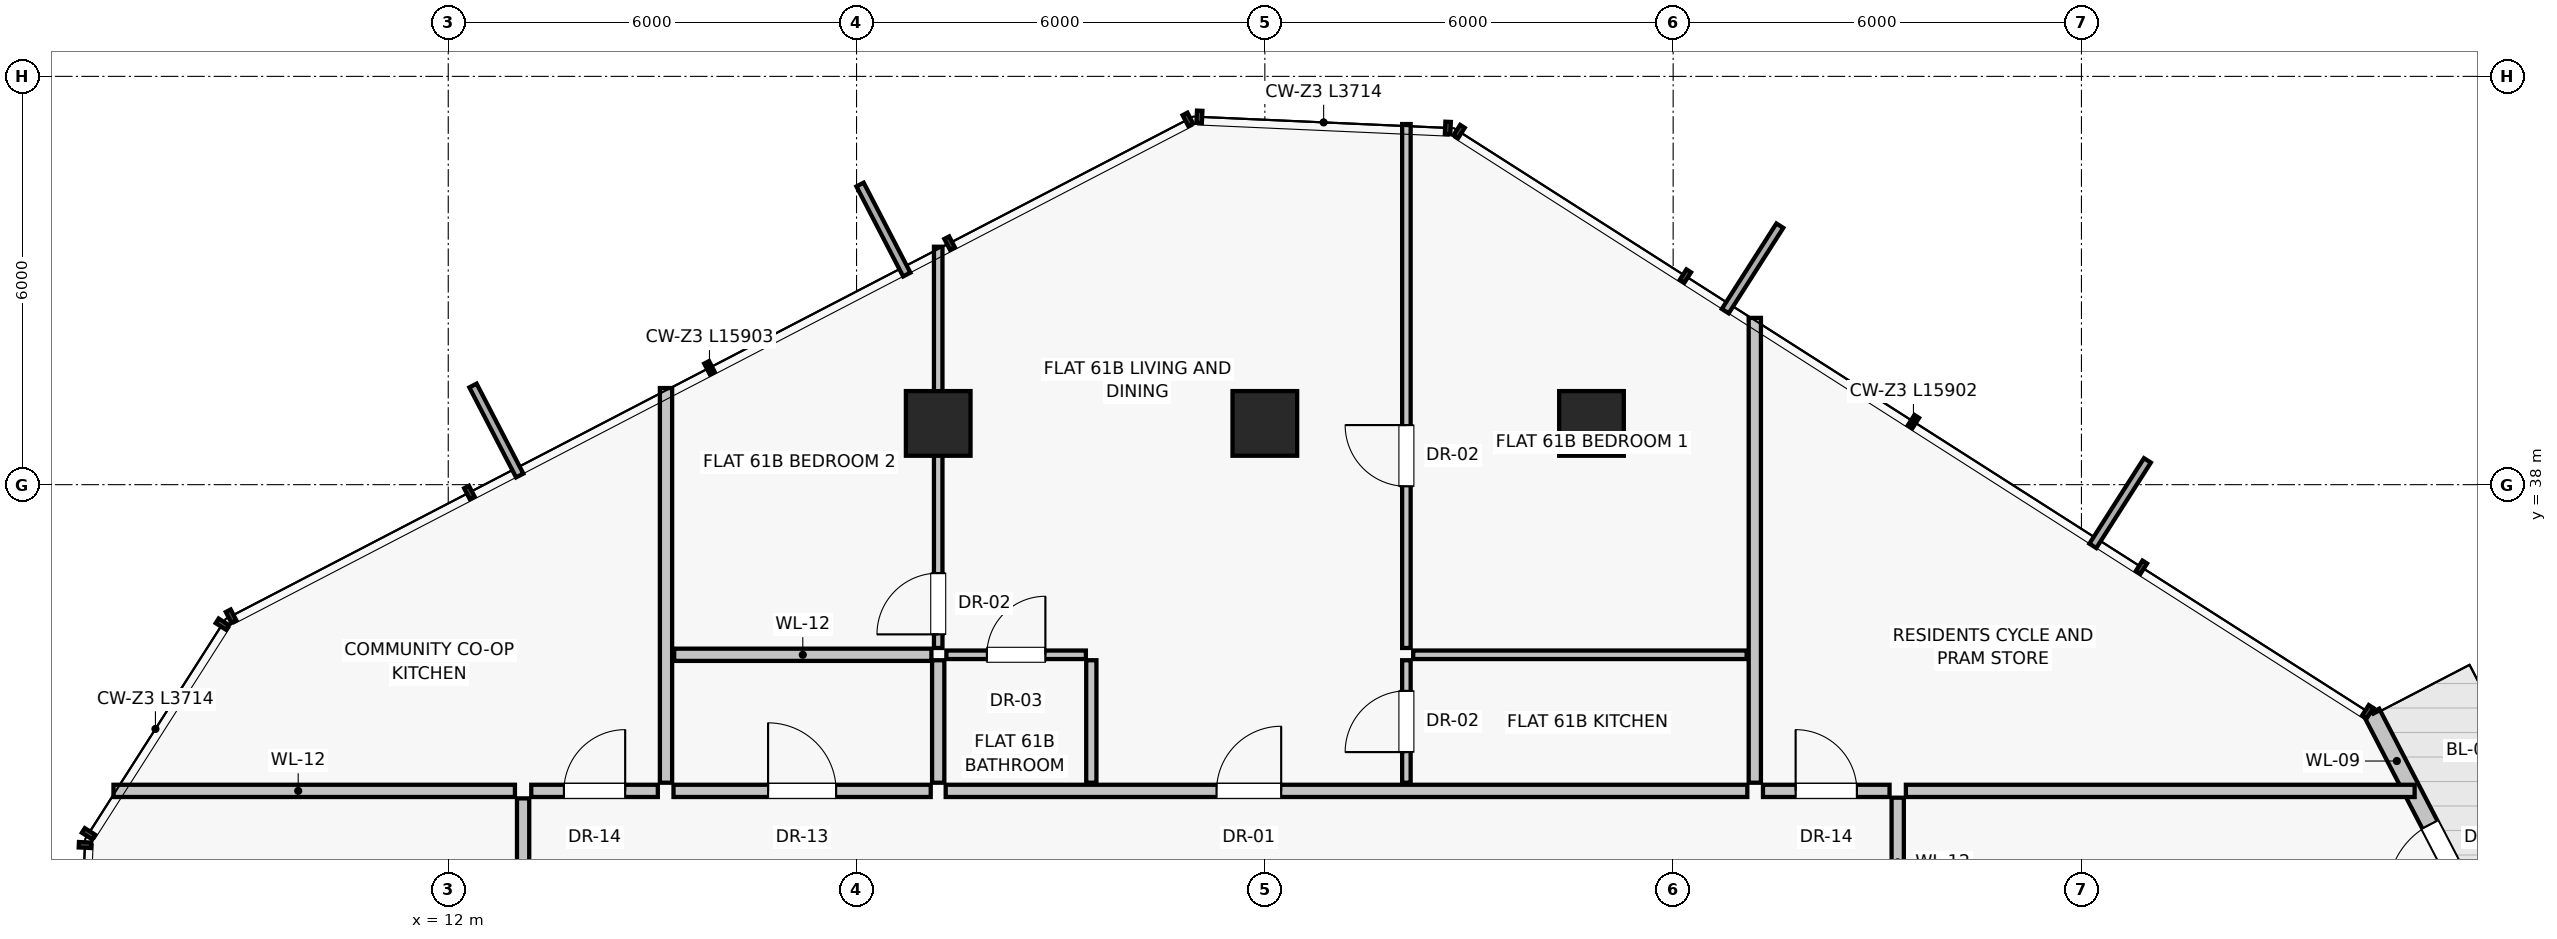
"""IFC4 building model, lengths in metres.
Left out: names, types, materials, properties, quantities, classifications, styles, units other than length and angle.
Written with IfcOpenShell. Run it as: python <this file> out.ifc"""

import sys

from ifc_helpers import new_model, si_unit, direction, frame, frame_2d, origin, origin_2d, place, context, subcontext, project, spatial, rectangle, extrude, source, transform, mapped, element, fill, save


model = new_model("IFC4")
c1 = context("Model", 3, precision=1e-05, world=origin(), true_north=direction((0.0, 1.0)))
c2 = subcontext(c1, "Body", "Model", "MODEL_VIEW")
j1 = project(units=[si_unit("LENGTHUNIT", "METRE"), si_unit("PLANEANGLEUNIT", "RADIAN")], contexts=[c1])
p1 = place(None, origin())
s1 = spatial("IfcSite", under=j1, at=p1, CompositionType="ELEMENT")
p2 = place(p1, origin())
s2 = spatial("IfcBuilding", under=s1, at=p2, CompositionType="ELEMENT")
p3 = place(p2, frame((0.0, 0.0, 215.65)))
s3 = spatial("IfcBuildingStorey", under=s2, at=p3, CompositionType="ELEMENT", Elevation=215.65)
for number, where, z_axis, x_axis in (
    (1, (28.8, 38.9, 0.0), (0.0, 0.0, 1.0), (1.0, 0.0, 0.0)),
    (2, (24.0, 38.9, 0.0), (0.0, 0.0, 1.0), (1.0, 0.0, 0.0)),
    (3, (19.2, 38.9, 0.0), (0.0, 0.0, 1.0), (1.0, 0.0, 0.0)),
):
    element("IfcColumn", number, at=place(p3, frame(where, z_axis=z_axis, x_axis=x_axis)), inside=s3, PredefinedType="COLUMN", context=c2, shape_type="SweptSolid", body=[
        extrude(rectangle(XDim=0.95, YDim=0.95, at=origin_2d()), origin(), (0.0, 0.0, 1.0), 3.25),
    ])
p4 = place(p3, frame((42.069, 31.177, 0.0), z_axis=(0.0, 0.0, 1.0), x_axis=(-0.460857783271, 0.887474001646, 0.0)))
e4 = element("IfcWall", 4, at=p4, inside=s3, PredefinedType="SOLIDWALL", context=c2, shape_type="SweptSolid", body=[
    extrude(rectangle(XDim=3.914, YDim=0.25, at=frame_2d((1.957, 0.0))), origin(), (0.0, 0.0, 1.0), 3.015),
])
p5 = place(p4, frame((0.91, 0.0, 0.0)))
e5 = element("IfcOpeningElement", 5, at=p5, cuts=e4, PredefinedType="OPENING", context=c2, shape_type="SweptSolid", body=[
    extrude(rectangle(XDim=1.15, YDim=2.25, at=frame_2d((0.575, 1.125))), frame((0.0, 0.135, 0.0), z_axis=(0.0, -1.0, 0.0), x_axis=(1.0, 0.0, 0.0)), (0.0, 0.0, 1.0), 0.27),
])
p6 = place(p3, frame((15.2, 33.62, 0.0), z_axis=(0.0, 0.0, 1.0), x_axis=(0.0, 1.0, 0.0)))
e6 = element("IfcWall", 6, at=p6, inside=s3, PredefinedType="PARTITIONING", context=c2, shape_type="SweptSolid", body=[
    extrude(rectangle(XDim=5.8, YDim=0.18, at=frame_2d((2.9, 0.0))), origin(), (0.0, 0.0, 1.0), 3.015),
])
p7 = place(p3, frame((31.2, 33.62, 0.0), z_axis=(0.0, 0.0, 1.0), x_axis=(0.0, 1.0, 0.0)))
e7 = element("IfcWall", 7, at=p7, inside=s3, PredefinedType="PARTITIONING", context=c2, shape_type="SweptSolid", body=[
    extrude(rectangle(XDim=6.831, YDim=0.18, at=frame_2d((3.416, 0.0))), origin(), (0.0, 0.0, 1.0), 3.015),
])
p8 = place(p3, frame((15.31, 33.5, 0.0), z_axis=(0.0, 0.0, 1.0), x_axis=(1.0, 0.0, 0.0)))
e8 = element("IfcWall", 8, at=p8, inside=s3, PredefinedType="PARTITIONING", context=c2, shape_type="SweptSolid", body=[
    extrude(rectangle(XDim=3.78, YDim=0.18, at=frame_2d((1.89, 0.0))), origin(), (0.0, 0.0, 1.0), 3.015),
])
p9 = place(p8, frame((1.39, 0.0, 0.0)))
e9 = element("IfcOpeningElement", 9, at=p9, cuts=e8, PredefinedType="OPENING", context=c2, shape_type="SweptSolid", body=[
    extrude(rectangle(XDim=1.0, YDim=2.01, at=frame_2d((0.5, 1.005))), frame((0.0, 0.1, 0.0), z_axis=(0.0, -1.0, 0.0), x_axis=(1.0, 0.0, 0.0)), (0.0, 0.0, 1.0), 0.2),
])
p10 = place(p3, frame((19.31, 33.5, 0.0), z_axis=(0.0, 0.0, 1.0), x_axis=(1.0, 0.0, 0.0)))
e10 = element("IfcWall", 10, at=p10, inside=s3, PredefinedType="PARTITIONING", context=c2, shape_type="SweptSolid", body=[
    extrude(rectangle(XDim=11.78, YDim=0.18, at=frame_2d((5.89, 0.0))), origin(), (0.0, 0.0, 1.0), 3.015),
])
p11 = place(p10, frame((3.98, 0.0, 0.0)))
e11 = element("IfcOpeningElement", 11, at=p11, cuts=e10, PredefinedType="OPENING", context=c2, shape_type="SweptSolid", body=[
    extrude(rectangle(XDim=0.95, YDim=2.02, at=frame_2d((0.475, 1.01))), frame((0.0, 0.1, 0.0), z_axis=(0.0, -1.0, 0.0), x_axis=(1.0, 0.0, 0.0)), (0.0, 0.0, 1.0), 0.2),
])
p12 = place(p3, frame((15.32, 35.5, 0.0), z_axis=(0.0, 0.0, 1.0), x_axis=(1.0, 0.0, 0.0)))
e12 = element("IfcWall", 12, at=p12, inside=s3, PredefinedType="PARTITIONING", context=c2, shape_type="SweptSolid", body=[
    extrude(rectangle(XDim=3.78, YDim=0.18, at=frame_2d((1.89, 0.0))), origin(), (0.0, 0.0, 1.0), 3.015),
])
p13 = place(p3, frame((19.2, 33.62, 0.0), z_axis=(0.0, 0.0, 1.0), x_axis=(0.0, 1.0, 0.0)))
e13 = element("IfcWall", 13, at=p13, inside=s3, PredefinedType="PARTITIONING", context=c2, shape_type="SweptSolid", body=[
    extrude(rectangle(XDim=1.8, YDim=0.18, at=frame_2d((0.9, 0.0))), origin(), (0.0, 0.0, 1.0), 3.015),
])
p14 = place(p3, frame((19.2, 35.6, 0.0), z_axis=(0.0, 0.0, 1.0), x_axis=(0.0, 1.0, 0.0)))
e14 = element("IfcWall", 14, at=p14, inside=s3, PredefinedType="PARTITIONING", context=c2, shape_type="SweptSolid", body=[
    extrude(rectangle(XDim=5.897, YDim=0.125, at=frame_2d((2.948, 0.0))), origin(), (0.0, 0.0, 1.0), 2.469),
])
p15 = place(p14, frame((0.2, 0.0, 0.0)))
e15 = element("IfcOpeningElement", 15, at=p15, cuts=e14, PredefinedType="OPENING", context=c2, shape_type="SweptSolid", body=[
    extrude(rectangle(XDim=0.9, YDim=2.01, at=frame_2d((0.45, 1.005))), frame((0.0, 0.073, 0.0), z_axis=(0.0, -1.0, 0.0), x_axis=(1.0, 0.0, 0.0)), (0.0, 0.0, 1.0), 0.145),
])
p16 = place(p3, frame((21.45, 33.62, 0.0), z_axis=(0.0, 0.0, 1.0), x_axis=(0.0, 1.0, 0.0)))
e16 = element("IfcWall", 16, at=p16, inside=s3, PredefinedType="PARTITIONING", context=c2, shape_type="SweptSolid", body=[
    extrude(rectangle(XDim=1.8, YDim=0.15, at=frame_2d((0.9, 0.0))), origin(), (0.0, 0.0, 1.0), 3.015),
])
p17 = place(p3, frame((19.32, 35.5, 0.0), z_axis=(0.0, 0.0, 1.0), x_axis=(1.0, 0.0, 0.0)))
e17 = element("IfcWall", 17, at=p17, inside=s3, PredefinedType="PARTITIONING", context=c2, shape_type="SweptSolid", body=[
    extrude(rectangle(XDim=2.05, YDim=0.125, at=frame_2d((1.025, 0.0))), origin(), (0.0, 0.0, 1.0), 2.662),
])
p18 = place(p17, frame((0.595, 0.0, 0.0)))
e18 = element("IfcOpeningElement", 18, at=p18, cuts=e17, PredefinedType="OPENING", context=c2, shape_type="SweptSolid", body=[
    extrude(rectangle(XDim=0.86, YDim=2.01, at=frame_2d((0.43, 1.005))), frame((0.0, 0.073, 0.0), z_axis=(0.0, -1.0, 0.0), x_axis=(1.0, 0.0, 0.0)), (0.0, 0.0, 1.0), 0.145),
])
p19 = place(p3, frame((26.08, 33.62, 0.0), z_axis=(0.0, 0.0, 1.0), x_axis=(0.0, 1.0, 0.0)))
e19 = element("IfcWall", 19, at=p19, inside=s3, PredefinedType="PARTITIONING", context=c2, shape_type="SweptSolid", body=[
    extrude(rectangle(XDim=1.8, YDim=0.125, at=frame_2d((0.9, 0.0))), origin(), (0.0, 0.0, 1.0), 3.015),
])
p20 = place(p19, frame((0.45, 0.0, 0.0)))
e20 = element("IfcOpeningElement", 20, at=p20, cuts=e19, PredefinedType="OPENING", context=c2, shape_type="SweptSolid", body=[
    extrude(rectangle(XDim=0.9, YDim=2.01, at=frame_2d((0.45, 1.005))), frame((0.0, 0.073, 0.0), z_axis=(0.0, -1.0, 0.0), x_axis=(1.0, 0.0, 0.0)), (0.0, 0.0, 1.0), 0.145),
])
p21 = place(p3, frame((26.18, 35.5, 0.0), z_axis=(0.0, 0.0, 1.0), x_axis=(1.0, 0.0, 0.0)))
e21 = element("IfcWall", 21, at=p21, inside=s3, PredefinedType="PARTITIONING", context=c2, shape_type="SweptSolid", body=[
    extrude(rectangle(XDim=4.9, YDim=0.125, at=frame_2d((2.45, 0.0))), origin(), (0.0, 0.0, 1.0), 2.662),
])
p22 = place(p3, frame((26.08, 35.6, 0.0), z_axis=(0.0, 0.0, 1.0), x_axis=(0.0, 1.0, 0.0)))
e22 = element("IfcWall", 22, at=p22, inside=s3, PredefinedType="PARTITIONING", context=c2, shape_type="SweptSolid", body=[
    extrude(rectangle(XDim=7.699, YDim=0.125, at=frame_2d((3.85, 0.0))), origin(), (0.0, 0.0, 1.0), 3.015),
])
p23 = place(p22, frame((2.376, 0.0, 0.0)))
e23 = element("IfcOpeningElement", 23, at=p23, cuts=e22, PredefinedType="OPENING", context=c2, shape_type="SweptSolid", body=[
    extrude(rectangle(XDim=0.9, YDim=2.01, at=frame_2d((0.45, 1.005))), frame((0.0, 0.073, 0.0), z_axis=(0.0, -1.0, 0.0), x_axis=(1.0, 0.0, 0.0)), (0.0, 0.0, 1.0), 0.145),
])
p24 = place(p3, frame((12.98, 33.5, 0.0), z_axis=(0.0, 0.0, 1.0), x_axis=(-1.0, 0.0, 0.0)))
e24 = element("IfcWall", 24, at=p24, inside=s3, PredefinedType="PARTITIONING", context=c2, shape_type="SweptSolid", body=[
    extrude(rectangle(XDim=5.9, YDim=0.18, at=frame_2d((2.95, 0.0))), origin(), (0.0, 0.0, 1.0), 3.015),
])
p25 = place(p3, frame((13.1, 28.088, 0.0), z_axis=(0.0, 0.0, 1.0), x_axis=(0.0, 1.0, 0.0)))
e25 = element("IfcWall", 25, at=p25, inside=s3, PredefinedType="PARTITIONING", context=c2, shape_type="SweptSolid", body=[
    extrude(rectangle(XDim=5.302, YDim=0.18, at=frame_2d((2.651, 0.0))), origin(), (0.0, 0.0, 1.0), 2.662),
])
p26 = place(p25, frame((2.151, 0.0, 0.0)))
e26 = element("IfcOpeningElement", 26, at=p26, cuts=e25, PredefinedType="OPENING", context=c2, shape_type="SweptSolid", body=[
    extrude(rectangle(XDim=1.0, YDim=2.01, at=frame_2d((0.5, 1.005))), frame((0.0, 0.1, 0.0), z_axis=(0.0, -1.0, 0.0), x_axis=(1.0, 0.0, 0.0)), (0.0, 0.0, 1.0), 0.2),
])
p27 = place(p3, frame((33.3, 31.5, 0.0), z_axis=(0.0, 0.0, 1.0), x_axis=(0.0, 1.0, 0.0)))
e27 = element("IfcWall", 27, at=p27, inside=s3, PredefinedType="PARTITIONING", context=c2, shape_type="SweptSolid", body=[
    extrude(rectangle(XDim=1.9, YDim=0.18, at=frame_2d((0.95, 0.0))), origin(), (0.0, 0.0, 1.0), 3.015),
])
p28 = place(p3, frame((13.22, 33.5, 0.0), z_axis=(0.0, 0.0, 1.0), x_axis=(1.0, 0.0, 0.0)))
e28 = element("IfcWall", 28, at=p28, inside=s3, PredefinedType="PARTITIONING", context=c2, shape_type="SweptSolid", body=[
    extrude(rectangle(XDim=1.86, YDim=0.18, at=frame_2d((0.93, 0.0))), origin(), (0.0, 0.0, 1.0), 3.015),
])
p29 = place(p28, frame((0.48, 0.0, 0.0)))
e29 = element("IfcOpeningElement", 29, at=p29, cuts=e28, PredefinedType="OPENING", context=c2, shape_type="SweptSolid", body=[
    extrude(rectangle(XDim=0.9, YDim=2.01, at=frame_2d((0.45, 1.005))), frame((0.0, 0.1, 0.0), z_axis=(0.0, -1.0, 0.0), x_axis=(1.0, 0.0, 0.0)), (0.0, 0.0, 1.0), 0.2),
])
p30 = place(p3, frame((33.42, 33.5, 0.0), z_axis=(0.0, 0.0, 1.0), x_axis=(1.0, 0.0, 0.0)))
e30 = element("IfcWall", 30, at=p30, inside=s3, PredefinedType="PARTITIONING", context=c2, shape_type="SweptSolid", body=[
    extrude(rectangle(XDim=7.476, YDim=0.18, at=frame_2d((3.738, 0.0))), origin(), (0.0, 0.0, 1.0), 3.015),
])
p31 = place(p3, frame((31.32, 33.5, 0.0), z_axis=(0.0, 0.0, 1.0), x_axis=(1.0, 0.0, 0.0)))
e31 = element("IfcWall", 31, at=p31, inside=s3, PredefinedType="PARTITIONING", context=c2, shape_type="SweptSolid", body=[
    extrude(rectangle(XDim=1.86, YDim=0.18, at=frame_2d((0.93, 0.0))), origin(), (0.0, 0.0, 1.0), 3.015),
])
p32 = place(p31, frame((0.48, 0.0, 0.0)))
e32 = element("IfcOpeningElement", 32, at=p32, cuts=e31, PredefinedType="OPENING", context=c2, shape_type="SweptSolid", body=[
    extrude(rectangle(XDim=0.9, YDim=2.01, at=frame_2d((0.45, 1.005))), frame((0.0, 0.1, 0.0), z_axis=(0.0, -1.0, 0.0), x_axis=(1.0, 0.0, 0.0)), (0.0, 0.0, 1.0), 0.2),
])
m1 = source(origin(), c2, "Body", "SweptSolid", [
    extrude(rectangle(XDim=1.15, YDim=2.25, at=frame_2d((0.575, 1.125))), frame((0.0, 0.025, 0.0), z_axis=(0.0, -1.0, 0.0), x_axis=(1.0, 0.0, 0.0)), (0.0, 0.0, 1.0), 0.05),
])
p33 = place(p5, frame((1.15, 0.0, 0.0), z_axis=(0.0, 0.0, 1.0), x_axis=(-1.0, 0.0, 0.0)))
e33 = element("IfcDoor", 33, at=p33, inside=s3, OperationType="SINGLE_SWING_LEFT", PredefinedType="DOOR", context=c2, shape_type="MappedRepresentation", body=[
    mapped(m1, transform((0.0, 0.0, 0.0), scale=1.0)),
])
fill(e5, e33)
m2 = source(origin(), c2, "Body", "SweptSolid", [
    extrude(rectangle(XDim=1.0, YDim=2.01, at=frame_2d((0.5, 1.005))), frame((0.0, 0.025, 0.0), z_axis=(0.0, -1.0, 0.0), x_axis=(1.0, 0.0, 0.0)), (0.0, 0.0, 1.0), 0.05),
])
p34 = place(p9, origin())
e34 = element("IfcDoor", 34, at=p34, inside=s3, OperationType="SINGLE_SWING_LEFT", PredefinedType="DOOR", context=c2, shape_type="MappedRepresentation", body=[
    mapped(m2, transform((0.0, 0.0, 0.0), scale=1.0)),
])
fill(e9, e34)
m3 = source(origin(), c2, "Body", "SweptSolid", [
    extrude(rectangle(XDim=0.95, YDim=2.02, at=frame_2d((0.475, 1.01))), frame((0.0, 0.025, 0.0), z_axis=(0.0, -1.0, 0.0), x_axis=(1.0, 0.0, 0.0)), (0.0, 0.0, 1.0), 0.05),
])
p35 = place(p11, origin())
e35 = element("IfcDoor", 35, at=p35, inside=s3, OperationType="SINGLE_SWING_RIGHT", PredefinedType="DOOR", context=c2, shape_type="MappedRepresentation", body=[
    mapped(m3, transform((0.0, 0.0, 0.0), scale=1.0)),
])
fill(e11, e35)
m4 = source(origin(), c2, "Body", "SweptSolid", [
    extrude(rectangle(XDim=0.9, YDim=2.01, at=frame_2d((0.45, 1.005))), frame((0.0, 0.025, 0.0), z_axis=(0.0, -1.0, 0.0), x_axis=(1.0, 0.0, 0.0)), (0.0, 0.0, 1.0), 0.05),
])
p36 = place(p15, origin())
e36 = element("IfcDoor", 36, at=p36, inside=s3, OperationType="SINGLE_SWING_LEFT", PredefinedType="DOOR", context=c2, shape_type="MappedRepresentation", body=[
    mapped(m4, transform((0.0, 0.0, 0.0), scale=1.0)),
])
fill(e15, e36)
m5 = source(origin(), c2, "Body", "SweptSolid", [
    extrude(rectangle(XDim=0.86, YDim=2.01, at=frame_2d((0.43, 1.005))), frame((0.0, 0.025, 0.0), z_axis=(0.0, -1.0, 0.0), x_axis=(1.0, 0.0, 0.0)), (0.0, 0.0, 1.0), 0.05),
])
p37 = place(p18, origin())
e37 = element("IfcDoor", 37, at=p37, inside=s3, OperationType="SINGLE_SWING_RIGHT", PredefinedType="DOOR", context=c2, shape_type="MappedRepresentation", body=[
    mapped(m5, transform((0.0, 0.0, 0.0), scale=1.0)),
])
fill(e18, e37)
p38 = place(p20, origin())
e38 = element("IfcDoor", 38, at=p38, inside=s3, OperationType="SINGLE_SWING_LEFT", PredefinedType="DOOR", context=c2, shape_type="MappedRepresentation", body=[
    mapped(m4, transform((0.0, 0.0, 0.0), scale=1.0)),
])
fill(e20, e38)
p39 = place(p23, origin())
e39 = element("IfcDoor", 39, at=p39, inside=s3, OperationType="SINGLE_SWING_RIGHT", PredefinedType="DOOR", context=c2, shape_type="MappedRepresentation", body=[
    mapped(m4, transform((0.0, 0.0, 0.0), scale=1.0)),
])
fill(e23, e39)
p40 = place(p29, origin())
e40 = element("IfcDoor", 40, at=p40, inside=s3, OperationType="SINGLE_SWING_RIGHT", PredefinedType="DOOR", context=c2, shape_type="MappedRepresentation", body=[
    mapped(m4, transform((0.0, 0.0, 0.0), scale=1.0)),
])
fill(e29, e40)
p41 = place(p32, origin())
e41 = element("IfcDoor", 41, at=p41, inside=s3, OperationType="SINGLE_SWING_LEFT", PredefinedType="DOOR", context=c2, shape_type="MappedRepresentation", body=[
    mapped(m4, transform((0.0, 0.0, 0.0), scale=1.0)),
])
fill(e32, e41)
save(model, sys.argv[1])
